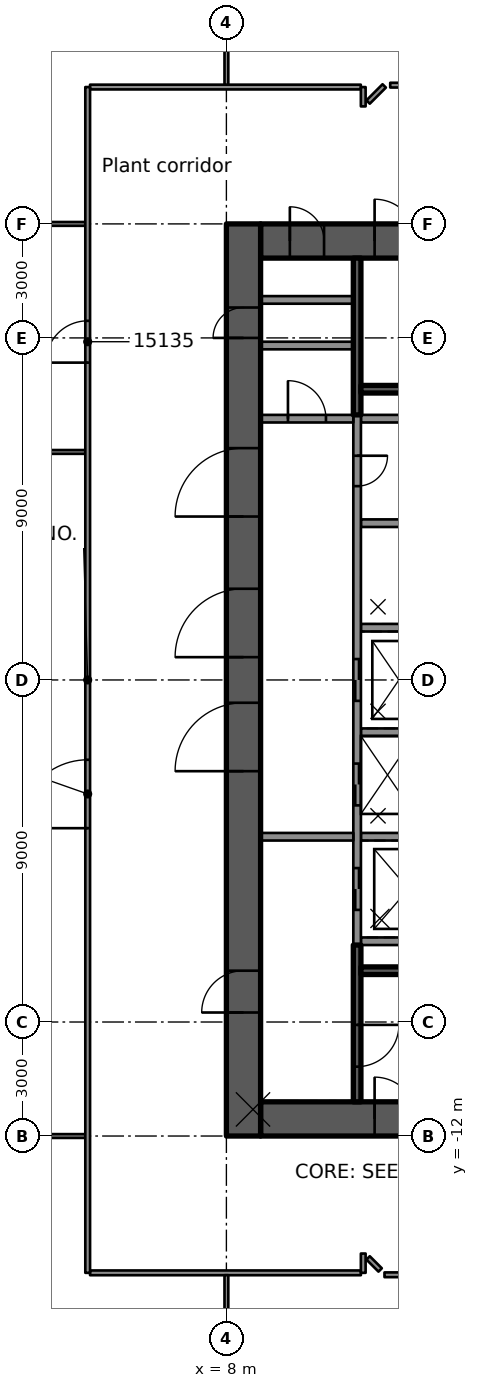
"""IFC4 building model, lengths in metres.
Left out: names, types, materials, properties, quantities, classifications, styles, units other than length and angle.
Written with IfcOpenShell. Run it as: python <this file> out.ifc"""

import sys

from ifc_helpers import new_model, si_unit, direction, frame, frame_2d, origin, place, context, subcontext, project, spatial, rectangle, extrude, element, fill, save


model = new_model("IFC4")
c1 = context("Model", 3, precision=1e-05, world=origin(), true_north=direction((0.0, 1.0)))
c2 = subcontext(c1, "Body", "Model", "MODEL_VIEW")
j1 = project(units=[si_unit("LENGTHUNIT", "METRE"), si_unit("PLANEANGLEUNIT", "RADIAN")], contexts=[c1])
p1 = place(None, origin())
s1 = spatial("IfcSite", under=j1, at=p1, CompositionType="ELEMENT")
p2 = place(p1, origin())
s2 = spatial("IfcBuilding", under=s1, at=p2, CompositionType="ELEMENT")
p3 = place(p2, frame((0.0, 0.0, 76.3)))
s3 = spatial("IfcBuildingStorey", under=s2, at=p3, CompositionType="ELEMENT", Elevation=76.3)
p4 = place(p3, frame((8.9, 11.55, 0.0), z_axis=(0.0, 0.0, 1.0), x_axis=(1.0, 0.0, 0.0)))
e1 = element("IfcWall", 1, at=p4, inside=s3, PredefinedType="SHEAR", context=c2, shape_type="SweptSolid", body=[
    extrude(rectangle(XDim=9.2, YDim=0.9, at=frame_2d((4.6, 0.0))), origin(), (0.0, 0.0, 1.0), 4.4),
])
p5 = place(p4, frame((3.0, 0.0, 0.0)))
e2 = element("IfcOpeningElement", 2, at=p5, cuts=e1, PredefinedType="OPENING", context=c2, shape_type="SweptSolid", body=[
    extrude(rectangle(XDim=1.1, YDim=2.1, at=frame_2d((0.55, 1.05))), frame((0.0, 0.46, 0.0), z_axis=(0.0, -1.0, 0.0), x_axis=(1.0, 0.0, 0.0)), (0.0, 0.0, 1.0), 0.92),
])
p6 = place(p4, frame((0.77, 0.0, 0.0)))
e3 = element("IfcOpeningElement", 3, at=p6, cuts=e1, PredefinedType="OPENING", context=c2, shape_type="SweptSolid", body=[
    extrude(rectangle(XDim=0.9, YDim=2.1, at=frame_2d((0.45, 1.05))), frame((0.0, 0.46, 0.0), z_axis=(0.0, -1.0, 0.0), x_axis=(1.0, 0.0, 0.0)), (0.0, 0.0, 1.0), 0.92),
])
p7 = place(p3, frame((8.9, -11.55, 0.0), z_axis=(0.0, 0.0, 1.0), x_axis=(1.0, 0.0, 0.0)))
e4 = element("IfcWall", 4, at=p7, inside=s3, PredefinedType="SHEAR", context=c2, shape_type="SweptSolid", body=[
    extrude(rectangle(XDim=9.2, YDim=0.9, at=frame_2d((4.6, 0.0))), origin(), (0.0, 0.0, 1.0), 4.4),
])
p8 = place(p7, frame((3.0, 0.0, 0.0)))
e5 = element("IfcOpeningElement", 5, at=p8, cuts=e4, PredefinedType="OPENING", context=c2, shape_type="SweptSolid", body=[
    extrude(rectangle(XDim=1.1, YDim=2.1, at=frame_2d((0.55, 1.05))), frame((0.0, 0.46, 0.0), z_axis=(0.0, -1.0, 0.0), x_axis=(1.0, 0.0, 0.0)), (0.0, 0.0, 1.0), 0.92),
])
p9 = place(p3, frame((8.45, -12.0, 0.0), z_axis=(0.0, 0.0, 1.0), x_axis=(0.0, 1.0, 0.0)))
e6 = element("IfcWall", 6, at=p9, inside=s3, PredefinedType="SHEAR", context=c2, shape_type="SweptSolid", body=[
    extrude(rectangle(XDim=24.0, YDim=0.9, at=frame_2d((12.0, 0.0))), origin(), (0.0, 0.0, 1.0), 4.4),
])
p10 = place(p9, frame((12.6, 0.0, 0.0)))
e7 = element("IfcOpeningElement", 7, at=p10, cuts=e6, PredefinedType="OPENING", context=c2, shape_type="SweptSolid", body=[
    extrude(rectangle(XDim=1.8, YDim=2.1, at=frame_2d((0.9, 1.05))), frame((0.0, 0.46, 0.0), z_axis=(0.0, -1.0, 0.0), x_axis=(1.0, 0.0, 0.0)), (0.0, 0.0, 1.0), 0.92),
])
p11 = place(p9, frame((16.3, 0.0, 0.0)))
e8 = element("IfcOpeningElement", 8, at=p11, cuts=e6, PredefinedType="OPENING", context=c2, shape_type="SweptSolid", body=[
    extrude(rectangle(XDim=1.8, YDim=2.1, at=frame_2d((0.9, 1.05))), frame((0.0, 0.46, 0.0), z_axis=(0.0, -1.0, 0.0), x_axis=(1.0, 0.0, 0.0)), (0.0, 0.0, 1.0), 0.92),
])
p12 = place(p9, frame((9.6, 0.0, 0.0)))
e9 = element("IfcOpeningElement", 9, at=p12, cuts=e6, PredefinedType="OPENING", context=c2, shape_type="SweptSolid", body=[
    extrude(rectangle(XDim=1.8, YDim=2.1, at=frame_2d((0.9, 1.05))), frame((0.0, 0.46, 0.0), z_axis=(0.0, -1.0, 0.0), x_axis=(1.0, 0.0, 0.0)), (0.0, 0.0, 1.0), 0.92),
])
p13 = place(p9, frame((3.25, 0.0, 0.0)))
e10 = element("IfcOpeningElement", 10, at=p13, cuts=e6, PredefinedType="OPENING", context=c2, shape_type="SweptSolid", body=[
    extrude(rectangle(XDim=1.1, YDim=2.1, at=frame_2d((0.55, 1.05))), frame((0.0, 0.46, 0.0), z_axis=(0.0, -1.0, 0.0), x_axis=(1.0, 0.0, 0.0)), (0.0, 0.0, 1.0), 0.92),
])
p14 = place(p9, frame((21.0, 0.0, 0.0)))
e11 = element("IfcOpeningElement", 11, at=p14, cuts=e6, PredefinedType="OPENING", context=c2, shape_type="SweptSolid", body=[
    extrude(rectangle(XDim=0.8, YDim=2.1, at=frame_2d((0.4, 1.05))), frame((0.0, 0.46, 0.0), z_axis=(0.0, -1.0, 0.0), x_axis=(1.0, 0.0, 0.0)), (0.0, 0.0, 1.0), 0.92),
])
for number, where, z_axis, x_axis in (
    (12, (11.54, -6.875, 0.0), (0.0, 0.0, 1.0), (1.0, 0.0, 0.0)),
    (13, (11.54, 6.875, 0.0), (0.0, 0.0, 1.0), (1.0, 0.0, 0.0)),
):
    element("IfcWall", number, at=place(p3, frame(where, z_axis=z_axis, x_axis=x_axis)), inside=s3, PredefinedType="SOLIDWALL", context=c2, shape_type="SweptSolid", body=[
        extrude(rectangle(XDim=6.56, YDim=0.2, at=frame_2d((3.28, 0.0))), origin(), (0.0, 0.0, 1.0), 3.99),
    ])
p15 = place(p3, frame((11.54, 4.125, 0.0), z_axis=(0.0, 0.0, 1.0), x_axis=(1.0, 0.0, 0.0)))
e14 = element("IfcWall", 14, at=p15, inside=s3, PredefinedType="SOLIDWALL", context=c2, shape_type="SweptSolid", body=[
    extrude(rectangle(XDim=4.7, YDim=0.2, at=frame_2d((2.35, 0.0))), origin(), (0.0, 0.0, 1.0), 3.99),
])
for number, where, z_axis, x_axis in (
    (15, (11.54, 1.375, 0.0), (0.0, 0.0, 1.0), (1.0, 0.0, 0.0)),
    (16, (11.54, -1.375, 0.0), (0.0, 0.0, 1.0), (1.0, 0.0, 0.0)),
):
    element("IfcWall", number, at=place(p3, frame(where, z_axis=z_axis, x_axis=x_axis)), inside=s3, PredefinedType="SOLIDWALL", context=c2, shape_type="SweptSolid", body=[
        extrude(rectangle(XDim=4.2, YDim=0.2, at=frame_2d((2.1, 0.0))), origin(), (0.0, 0.0, 1.0), 3.99),
    ])
p16 = place(p3, frame((11.54, -4.125, 0.0), z_axis=(0.0, 0.0, 1.0), x_axis=(1.0, 0.0, 0.0)))
e17 = element("IfcWall", 17, at=p16, inside=s3, PredefinedType="SOLIDWALL", context=c2, shape_type="SweptSolid", body=[
    extrude(rectangle(XDim=4.7, YDim=0.2, at=frame_2d((2.35, 0.0))), origin(), (0.0, 0.0, 1.0), 3.99),
])
p17 = place(p3, frame((11.44, 6.975, 0.0), z_axis=(0.0, 0.0, 1.0), x_axis=(0.0, -1.0, 0.0)))
e18 = element("IfcWall", 18, at=p17, inside=s3, PredefinedType="SOLIDWALL", context=c2, shape_type="SweptSolid", body=[
    extrude(rectangle(XDim=13.95, YDim=0.2, at=frame_2d((6.975, 0.0))), origin(), (0.0, 0.0, 1.0), 3.99),
])
p18 = place(p17, frame((6.425, 0.0, 0.0)))
e19 = element("IfcOpeningElement", 19, at=p18, cuts=e18, PredefinedType="OPENING", context=c2, shape_type="SweptSolid", body=[
    extrude(rectangle(XDim=1.1, YDim=2.1, at=frame_2d((0.55, 1.05))), frame((0.0, 0.11, 0.0), z_axis=(0.0, -1.0, 0.0), x_axis=(1.0, 0.0, 0.0)), (0.0, 0.0, 1.0), 0.22),
])
p19 = place(p17, frame((9.175, 0.0, 0.0)))
e20 = element("IfcOpeningElement", 20, at=p19, cuts=e18, PredefinedType="OPENING", context=c2, shape_type="SweptSolid", body=[
    extrude(rectangle(XDim=1.1, YDim=2.1, at=frame_2d((0.55, 1.05))), frame((0.0, 0.11, 0.0), z_axis=(0.0, -1.0, 0.0), x_axis=(1.0, 0.0, 0.0)), (0.0, 0.0, 1.0), 0.22),
])
p20 = place(p17, frame((11.925, 0.0, 0.0)))
e21 = element("IfcOpeningElement", 21, at=p20, cuts=e18, PredefinedType="OPENING", context=c2, shape_type="SweptSolid", body=[
    extrude(rectangle(XDim=1.1, YDim=2.1, at=frame_2d((0.55, 1.05))), frame((0.0, 0.11, 0.0), z_axis=(0.0, -1.0, 0.0), x_axis=(1.0, 0.0, 0.0)), (0.0, 0.0, 1.0), 0.22),
])
p21 = place(p17, frame((1.075, 0.0, 0.0)))
e22 = element("IfcOpeningElement", 22, at=p21, cuts=e18, PredefinedType="OPENING", context=c2, shape_type="SweptSolid", body=[
    extrude(rectangle(XDim=0.8, YDim=2.1, at=frame_2d((0.4, 1.05))), frame((0.0, 0.11, 0.0), z_axis=(0.0, -1.0, 0.0), x_axis=(1.0, 0.0, 0.0)), (0.0, 0.0, 1.0), 0.22),
])
p22 = place(p3, frame((11.44, -6.975, 0.0), z_axis=(0.0, 0.0, 1.0), x_axis=(0.0, -1.0, 0.0)))
e23 = element("IfcWall", 23, at=p22, inside=s3, PredefinedType="SOLIDWALL", context=c2, shape_type="SweptSolid", body=[
    extrude(rectangle(XDim=4.125, YDim=0.2, at=frame_2d((2.062, 0.0))), origin(), (0.0, 0.0, 1.0), 3.99),
])
p23 = place(p22, frame((2.1, 0.0, 0.0)))
e24 = element("IfcOpeningElement", 24, at=p23, cuts=e23, PredefinedType="OPENING", context=c2, shape_type="SweptSolid", body=[
    extrude(rectangle(XDim=1.1, YDim=2.1, at=frame_2d((0.55, 1.05))), frame((0.0, 0.11, 0.0), z_axis=(0.0, -1.0, 0.0), x_axis=(1.0, 0.0, 0.0)), (0.0, 0.0, 1.0), 0.22),
])
p24 = place(p3, frame((11.54, -7.65, 0.0), z_axis=(0.0, 0.0, 1.0), x_axis=(1.0, 0.0, 0.0)))
e25 = element("IfcWall", 25, at=p24, inside=s3, PredefinedType="SOLIDWALL", context=c2, shape_type="SweptSolid", body=[
    extrude(rectangle(XDim=6.56, YDim=0.2, at=frame_2d((3.28, 0.0))), origin(), (0.0, 0.0, 1.0), 3.99),
])
p25 = place(p3, frame((11.44, 11.1, 0.0), z_axis=(0.0, 0.0, 1.0), x_axis=(0.0, -1.0, 0.0)))
e26 = element("IfcWall", 26, at=p25, inside=s3, PredefinedType="SOLIDWALL", context=c2, shape_type="SweptSolid", body=[
    extrude(rectangle(XDim=4.125, YDim=0.2, at=frame_2d((2.062, 0.0))), origin(), (0.0, 0.0, 1.0), 3.99),
])
p26 = place(p3, frame((11.54, 7.65, 0.0), z_axis=(0.0, 0.0, 1.0), x_axis=(1.0, 0.0, 0.0)))
e27 = element("IfcWall", 27, at=p26, inside=s3, PredefinedType="SOLIDWALL", context=c2, shape_type="SweptSolid", body=[
    extrude(rectangle(XDim=6.56, YDim=0.2, at=frame_2d((3.28, 0.0))), origin(), (0.0, 0.0, 1.0), 3.99),
])
p27 = place(p3, frame((8.9, -4.125, 0.0), z_axis=(0.0, 0.0, 1.0), x_axis=(1.0, 0.0, 0.0)))
e28 = element("IfcWall", 28, at=p27, inside=s3, PredefinedType="PARTITIONING", context=c2, shape_type="SweptSolid", body=[
    extrude(rectangle(XDim=2.44, YDim=0.2, at=frame_2d((1.22, 0.0))), origin(), (0.0, 0.0, 1.0), 3.99),
])
p28 = place(p3, frame((8.9, 6.875, 0.0), z_axis=(0.0, 0.0, 1.0), x_axis=(1.0, 0.0, 0.0)))
e29 = element("IfcWall", 29, at=p28, inside=s3, PredefinedType="PARTITIONING", context=c2, shape_type="SweptSolid", body=[
    extrude(rectangle(XDim=2.44, YDim=0.2, at=frame_2d((1.22, 0.0))), origin(), (0.0, 0.0, 1.0), 3.99),
])
p29 = place(p28, frame((0.72, 0.0, 0.0)))
e30 = element("IfcOpeningElement", 30, at=p29, cuts=e29, PredefinedType="OPENING", context=c2, shape_type="SweptSolid", body=[
    extrude(rectangle(XDim=1.0, YDim=2.1, at=frame_2d((0.5, 1.05))), frame((0.0, 0.11, 0.0), z_axis=(0.0, -1.0, 0.0), x_axis=(1.0, 0.0, 0.0)), (0.0, 0.0, 1.0), 0.22),
])
for number, where, z_axis, x_axis in (
    (31, (8.9, 10.0, 0.0), (0.0, 0.0, 1.0), (1.0, 0.0, 0.0)),
    (32, (8.9, 8.8, 0.0), (0.0, 0.0, 1.0), (1.0, 0.0, 0.0)),
):
    element("IfcWall", number, at=place(p3, frame(where, z_axis=z_axis, x_axis=x_axis)), inside=s3, PredefinedType="PARTITIONING", context=c2, shape_type="SweptSolid", body=[
        extrude(rectangle(XDim=2.44, YDim=0.2, at=frame_2d((1.22, 0.0))), origin(), (0.0, 0.0, 1.0), 3.99),
    ])
p30 = place(p3, frame((11.729, -15.207, 0.0), z_axis=(0.0, 0.0, 1.0), x_axis=(0.707106781187, -0.707106781187, 0.0)))
e33 = element("IfcWall", 33, at=p30, inside=s3, PredefinedType="PARTITIONING", context=c2, shape_type="SweptSolid", body=[
    extrude(rectangle(XDim=0.448, YDim=0.125, at=frame_2d((0.224, 0.0))), origin(), (0.0, 0.0, 1.0), 3.98),
])
p31 = place(p3, frame((22.642, -15.651, 0.0), z_axis=(0.0, 0.0, 1.0), x_axis=(-1.0, 0.0, 0.0)))
e34 = element("IfcWall", 34, at=p31, inside=s3, PredefinedType="PARTITIONING", context=c2, shape_type="SweptSolid", body=[
    extrude(rectangle(XDim=10.482, YDim=0.125, at=frame_2d((5.241, 0.0))), origin(), (0.0, 0.0, 1.0), 3.98),
])
p32 = place(p31, frame((4.35, 0.0, 0.0)))
e35 = element("IfcOpeningElement", 35, at=p32, cuts=e34, PredefinedType="OPENING", context=c2, shape_type="SweptSolid", body=[
    extrude(rectangle(XDim=1.8, YDim=2.1, at=frame_2d((0.9, 1.05))), frame((0.0, 0.073, 0.0), z_axis=(0.0, -1.0, 0.0), x_axis=(1.0, 0.0, 0.0)), (0.0, 0.0, 1.0), 0.145),
])
p33 = place(p3, frame((4.412, -15.6, 0.0), z_axis=(0.0, 0.0, 1.0), x_axis=(1.0, 0.0, 0.0)))
e36 = element("IfcWall", 36, at=p33, inside=s3, PredefinedType="PARTITIONING", context=c2, shape_type="SweptSolid", body=[
    extrude(rectangle(XDim=7.127, YDim=0.125, at=frame_2d((3.563, 0.0))), origin(), (0.0, 0.0, 1.0), 3.98),
])
p34 = place(p3, frame((-4.287, -12.0, 0.0), z_axis=(0.0, 0.0, 1.0), x_axis=(1.0, 0.0, 0.0)))
e37 = element("IfcWall", 37, at=p34, inside=s3, PredefinedType="PARTITIONING", context=c2, shape_type="SweptSolid", body=[
    extrude(rectangle(XDim=8.574, YDim=0.1, at=frame_2d((4.287, 0.0))), origin(), (0.0, 0.0, 1.0), 3.98),
])
p35 = place(p3, frame((1.068, 6.0, 0.0), z_axis=(0.0, 0.0, 1.0), x_axis=(1.0, 0.0, 0.0)))
e38 = element("IfcWall", 38, at=p35, inside=s3, PredefinedType="PARTITIONING", context=c2, shape_type="SweptSolid", body=[
    extrude(rectangle(XDim=3.219, YDim=0.1, at=frame_2d((1.609, 0.0))), origin(), (0.0, 0.0, 1.0), 3.98),
])
p36 = place(p3, frame((-4.287, 12.0, 0.0), z_axis=(0.0, 0.0, 1.0), x_axis=(1.0, 0.0, 0.0)))
e39 = element("IfcWall", 39, at=p36, inside=s3, PredefinedType="PARTITIONING", context=c2, shape_type="SweptSolid", body=[
    extrude(rectangle(XDim=8.574, YDim=0.1, at=frame_2d((4.287, 0.0))), origin(), (0.0, 0.0, 1.0), 3.98),
])
p37 = place(p3, frame((4.412, 15.601, 0.0), z_axis=(0.0, 0.0, 1.0), x_axis=(1.0, 0.0, 0.0)))
e40 = element("IfcWall", 40, at=p37, inside=s3, PredefinedType="PARTITIONING", context=c2, shape_type="SweptSolid", body=[
    extrude(rectangle(XDim=7.125, YDim=0.125, at=frame_2d((3.562, 0.0))), origin(), (0.0, 0.0, 1.0), 3.98),
])
p38 = place(p3, frame((12.311, 15.651, 0.0), z_axis=(0.0, 0.0, 1.0), x_axis=(1.0, 0.0, 0.0)))
e41 = element("IfcWall", 41, at=p38, inside=s3, PredefinedType="PARTITIONING", context=c2, shape_type="SweptSolid", body=[
    extrude(rectangle(XDim=10.276, YDim=0.125, at=frame_2d((5.138, 0.0))), origin(), (0.0, 0.0, 1.0), 3.98),
])
p39 = place(p38, frame((4.199, 0.0, 0.0)))
e42 = element("IfcOpeningElement", 42, at=p39, cuts=e41, PredefinedType="OPENING", context=c2, shape_type="SweptSolid", body=[
    extrude(rectangle(XDim=1.8, YDim=2.1, at=frame_2d((0.9, 1.05))), frame((0.0, 0.073, 0.0), z_axis=(0.0, -1.0, 0.0), x_axis=(1.0, 0.0, 0.0)), (0.0, 0.0, 1.0), 0.145),
])
p40 = place(p3, frame((11.729, 15.207, 0.0), z_axis=(0.0, 0.0, 1.0), x_axis=(0.707106781187, 0.707106781187, 0.0)))
e43 = element("IfcWall", 43, at=p40, inside=s3, PredefinedType="PARTITIONING", context=c2, shape_type="SweptSolid", body=[
    extrude(rectangle(XDim=0.6, YDim=0.125, at=frame_2d((0.3, 0.0))), origin(), (0.0, 0.0, 1.0), 3.98),
])
for number, where, z_axis, x_axis in (
    (44, (11.601, -15.6, 0.0), (0.0, 0.0, 1.0), (0.0, 1.0, 0.0)),
    (45, (11.601, 15.092, 0.0), (0.0, 0.0, 1.0), (0.0, 1.0, 0.0)),
):
    element("IfcWall", number, at=place(p3, frame(where, z_axis=z_axis, x_axis=x_axis)), inside=s3, PredefinedType="PARTITIONING", context=c2, shape_type="SweptSolid", body=[
        extrude(rectangle(XDim=0.508, YDim=0.125, at=frame_2d((0.254, 0.0))), origin(), (0.0, 0.0, 1.0), 3.98),
    ])
p41 = place(p3, frame((8.0, -27.729, 0.0), z_axis=(0.0, 0.0, 1.0), x_axis=(0.0, 1.0, 0.0)))
e46 = element("IfcWall", 46, at=p41, inside=s3, PredefinedType="PARTITIONING", context=c2, shape_type="SweptSolid", body=[
    extrude(rectangle(XDim=12.067, YDim=0.1, at=frame_2d((6.033, 0.0))), origin(), (0.0, 0.0, 1.0), 3.98),
])
p42 = place(p3, frame((8.0, 15.664, 0.0), z_axis=(0.0, 0.0, 1.0), x_axis=(0.0, 1.0, 0.0)))
e47 = element("IfcWall", 47, at=p42, inside=s3, PredefinedType="PARTITIONING", context=c2, shape_type="SweptSolid", body=[
    extrude(rectangle(XDim=15.353, YDim=0.1, at=frame_2d((7.677, 0.0))), origin(), (0.0, 0.0, 1.0), 3.98),
])
p43 = place(p3, frame((4.35, -15.6, 0.0), z_axis=(0.0, 0.0, 1.0), x_axis=(0.0, 1.0, 0.0)))
e48 = element("IfcWall", 48, at=p43, inside=s3, PredefinedType="PARTITIONING", context=c2, shape_type="SweptSolid", body=[
    extrude(rectangle(XDim=31.201, YDim=0.125, at=frame_2d((15.601, 0.0))), origin(), (0.0, 0.0, 1.0), 3.98),
])
p44 = place(p43, frame((11.7, 0.0, 0.0)))
e49 = element("IfcOpeningElement", 49, at=p44, cuts=e48, PredefinedType="OPENING", context=c2, shape_type="SweptSolid", body=[
    extrude(rectangle(XDim=1.8, YDim=2.1, at=frame_2d((0.9, 1.05))), frame((0.0, 0.073, 0.0), z_axis=(0.0, -1.0, 0.0), x_axis=(1.0, 0.0, 0.0)), (0.0, 0.0, 1.0), 0.145),
])
p45 = place(p43, frame((23.95, 0.0, 0.0)))
e50 = element("IfcOpeningElement", 50, at=p45, cuts=e48, PredefinedType="OPENING", context=c2, shape_type="SweptSolid", body=[
    extrude(rectangle(XDim=1.1, YDim=2.1, at=frame_2d((0.55, 1.05))), frame((0.0, 0.073, 0.0), z_axis=(0.0, -1.0, 0.0), x_axis=(1.0, 0.0, 0.0)), (0.0, 0.0, 1.0), 0.145),
])
p46 = place(p18, origin())
e51 = element("IfcDoor", 51, at=p46, inside=s3, OperationType="DOUBLE_DOOR_SLIDING", PredefinedType="DOOR", context=c2, shape_type="SweptSolid", body=[
    extrude(rectangle(XDim=1.1, YDim=2.1, at=frame_2d((0.55, 1.05))), frame((0.0, 0.025, 0.0), z_axis=(0.0, -1.0, 0.0), x_axis=(1.0, 0.0, 0.0)), (0.0, 0.0, 1.0), 0.05),
])
fill(e19, e51)
p47 = place(p19, origin())
e52 = element("IfcDoor", 52, at=p47, inside=s3, OperationType="DOUBLE_DOOR_SLIDING", PredefinedType="DOOR", context=c2, shape_type="SweptSolid", body=[
    extrude(rectangle(XDim=1.1, YDim=2.1, at=frame_2d((0.55, 1.05))), frame((0.0, 0.025, 0.0), z_axis=(0.0, -1.0, 0.0), x_axis=(1.0, 0.0, 0.0)), (0.0, 0.0, 1.0), 0.05),
])
fill(e20, e52)
p48 = place(p20, origin())
e53 = element("IfcDoor", 53, at=p48, inside=s3, OperationType="DOUBLE_DOOR_SLIDING", PredefinedType="DOOR", context=c2, shape_type="SweptSolid", body=[
    extrude(rectangle(XDim=1.1, YDim=2.1, at=frame_2d((0.55, 1.05))), frame((0.0, 0.025, 0.0), z_axis=(0.0, -1.0, 0.0), x_axis=(1.0, 0.0, 0.0)), (0.0, 0.0, 1.0), 0.05),
])
fill(e21, e53)
p49 = place(p21, origin())
e54 = element("IfcDoor", 54, at=p49, inside=s3, OperationType="SINGLE_SWING_LEFT", PredefinedType="DOOR", context=c2, shape_type="SweptSolid", body=[
    extrude(rectangle(XDim=0.8, YDim=2.1, at=frame_2d((0.4, 1.05))), frame((0.0, 0.025, 0.0), z_axis=(0.0, -1.0, 0.0), x_axis=(1.0, 0.0, 0.0)), (0.0, 0.0, 1.0), 0.05),
])
fill(e22, e54)
p50 = place(p10, origin())
e55 = element("IfcDoor", 55, at=p50, inside=s3, OperationType="SINGLE_SWING_RIGHT", PredefinedType="DOOR", context=c2, shape_type="SweptSolid", body=[
    extrude(rectangle(XDim=1.8, YDim=2.1, at=frame_2d((0.9, 1.05))), frame((0.0, 0.025, 0.0), z_axis=(0.0, -1.0, 0.0), x_axis=(1.0, 0.0, 0.0)), (0.0, 0.0, 1.0), 0.05),
])
fill(e7, e55)
p51 = place(p11, origin())
e56 = element("IfcDoor", 56, at=p51, inside=s3, OperationType="SINGLE_SWING_RIGHT", PredefinedType="DOOR", context=c2, shape_type="SweptSolid", body=[
    extrude(rectangle(XDim=1.8, YDim=2.1, at=frame_2d((0.9, 1.05))), frame((0.0, 0.025, 0.0), z_axis=(0.0, -1.0, 0.0), x_axis=(1.0, 0.0, 0.0)), (0.0, 0.0, 1.0), 0.05),
])
fill(e8, e56)
p52 = place(p12, origin())
e57 = element("IfcDoor", 57, at=p52, inside=s3, OperationType="SINGLE_SWING_LEFT", PredefinedType="DOOR", context=c2, shape_type="SweptSolid", body=[
    extrude(rectangle(XDim=1.8, YDim=2.1, at=frame_2d((0.9, 1.05))), frame((0.0, 0.025, 0.0), z_axis=(0.0, -1.0, 0.0), x_axis=(1.0, 0.0, 0.0)), (0.0, 0.0, 1.0), 0.05),
])
fill(e9, e57)
p53 = place(p13, origin())
e58 = element("IfcDoor", 58, at=p53, inside=s3, OperationType="SINGLE_SWING_LEFT", PredefinedType="DOOR", context=c2, shape_type="SweptSolid", body=[
    extrude(rectangle(XDim=1.1, YDim=2.1, at=frame_2d((0.55, 1.05))), frame((0.0, 0.025, 0.0), z_axis=(0.0, -1.0, 0.0), x_axis=(1.0, 0.0, 0.0)), (0.0, 0.0, 1.0), 0.05),
])
fill(e10, e58)
p54 = place(p8, origin())
e59 = element("IfcDoor", 59, at=p54, inside=s3, OperationType="SINGLE_SWING_LEFT", PredefinedType="DOOR", context=c2, shape_type="SweptSolid", body=[
    extrude(rectangle(XDim=1.1, YDim=2.1, at=frame_2d((0.55, 1.05))), frame((0.0, 0.025, 0.0), z_axis=(0.0, -1.0, 0.0), x_axis=(1.0, 0.0, 0.0)), (0.0, 0.0, 1.0), 0.05),
])
fill(e5, e59)
p55 = place(p5, origin())
e60 = element("IfcDoor", 60, at=p55, inside=s3, OperationType="SINGLE_SWING_LEFT", PredefinedType="DOOR", context=c2, shape_type="SweptSolid", body=[
    extrude(rectangle(XDim=1.1, YDim=2.1, at=frame_2d((0.55, 1.05))), frame((0.0, 0.025, 0.0), z_axis=(0.0, -1.0, 0.0), x_axis=(1.0, 0.0, 0.0)), (0.0, 0.0, 1.0), 0.05),
])
fill(e2, e60)
p56 = place(p23, origin())
e61 = element("IfcDoor", 61, at=p56, inside=s3, OperationType="SINGLE_SWING_RIGHT", PredefinedType="DOOR", context=c2, shape_type="SweptSolid", body=[
    extrude(rectangle(XDim=1.1, YDim=2.1, at=frame_2d((0.55, 1.05))), frame((0.0, 0.025, 0.0), z_axis=(0.0, -1.0, 0.0), x_axis=(1.0, 0.0, 0.0)), (0.0, 0.0, 1.0), 0.05),
])
fill(e24, e61)
p57 = place(p6, origin())
e62 = element("IfcDoor", 62, at=p57, inside=s3, OperationType="SINGLE_SWING_LEFT", PredefinedType="DOOR", context=c2, shape_type="SweptSolid", body=[
    extrude(rectangle(XDim=0.9, YDim=2.1, at=frame_2d((0.45, 1.05))), frame((0.0, 0.025, 0.0), z_axis=(0.0, -1.0, 0.0), x_axis=(1.0, 0.0, 0.0)), (0.0, 0.0, 1.0), 0.05),
])
fill(e3, e62)
p58 = place(p14, origin())
e63 = element("IfcDoor", 63, at=p58, inside=s3, OperationType="SINGLE_SWING_RIGHT", PredefinedType="DOOR", context=c2, shape_type="SweptSolid", body=[
    extrude(rectangle(XDim=0.8, YDim=2.1, at=frame_2d((0.4, 1.05))), frame((0.0, 0.025, 0.0), z_axis=(0.0, -1.0, 0.0), x_axis=(1.0, 0.0, 0.0)), (0.0, 0.0, 1.0), 0.05),
])
fill(e11, e63)
p59 = place(p29, origin())
e64 = element("IfcDoor", 64, at=p59, inside=s3, OperationType="SINGLE_SWING_RIGHT", PredefinedType="DOOR", context=c2, shape_type="SweptSolid", body=[
    extrude(rectangle(XDim=1.0, YDim=2.1, at=frame_2d((0.5, 1.05))), frame((0.0, 0.025, 0.0), z_axis=(0.0, -1.0, 0.0), x_axis=(1.0, 0.0, 0.0)), (0.0, 0.0, 1.0), 0.05),
])
fill(e30, e64)
p60 = place(p44, origin())
e65 = element("IfcDoor", 65, at=p60, inside=s3, OperationType="DOUBLE_DOOR_SINGLE_SWING", PredefinedType="DOOR", context=c2, shape_type="SweptSolid", body=[
    extrude(rectangle(XDim=1.8, YDim=2.1, at=frame_2d((0.9, 1.05))), frame((0.0, 0.025, 0.0), z_axis=(0.0, -1.0, 0.0), x_axis=(1.0, 0.0, 0.0)), (0.0, 0.0, 1.0), 0.05),
])
fill(e49, e65)
p61 = place(p45, origin())
e66 = element("IfcDoor", 66, at=p61, inside=s3, OperationType="SINGLE_SWING_RIGHT", PredefinedType="DOOR", context=c2, shape_type="SweptSolid", body=[
    extrude(rectangle(XDim=1.1, YDim=2.1, at=frame_2d((0.55, 1.05))), frame((0.0, 0.025, 0.0), z_axis=(0.0, -1.0, 0.0), x_axis=(1.0, 0.0, 0.0)), (0.0, 0.0, 1.0), 0.05),
])
fill(e50, e66)
save(model, sys.argv[1])
